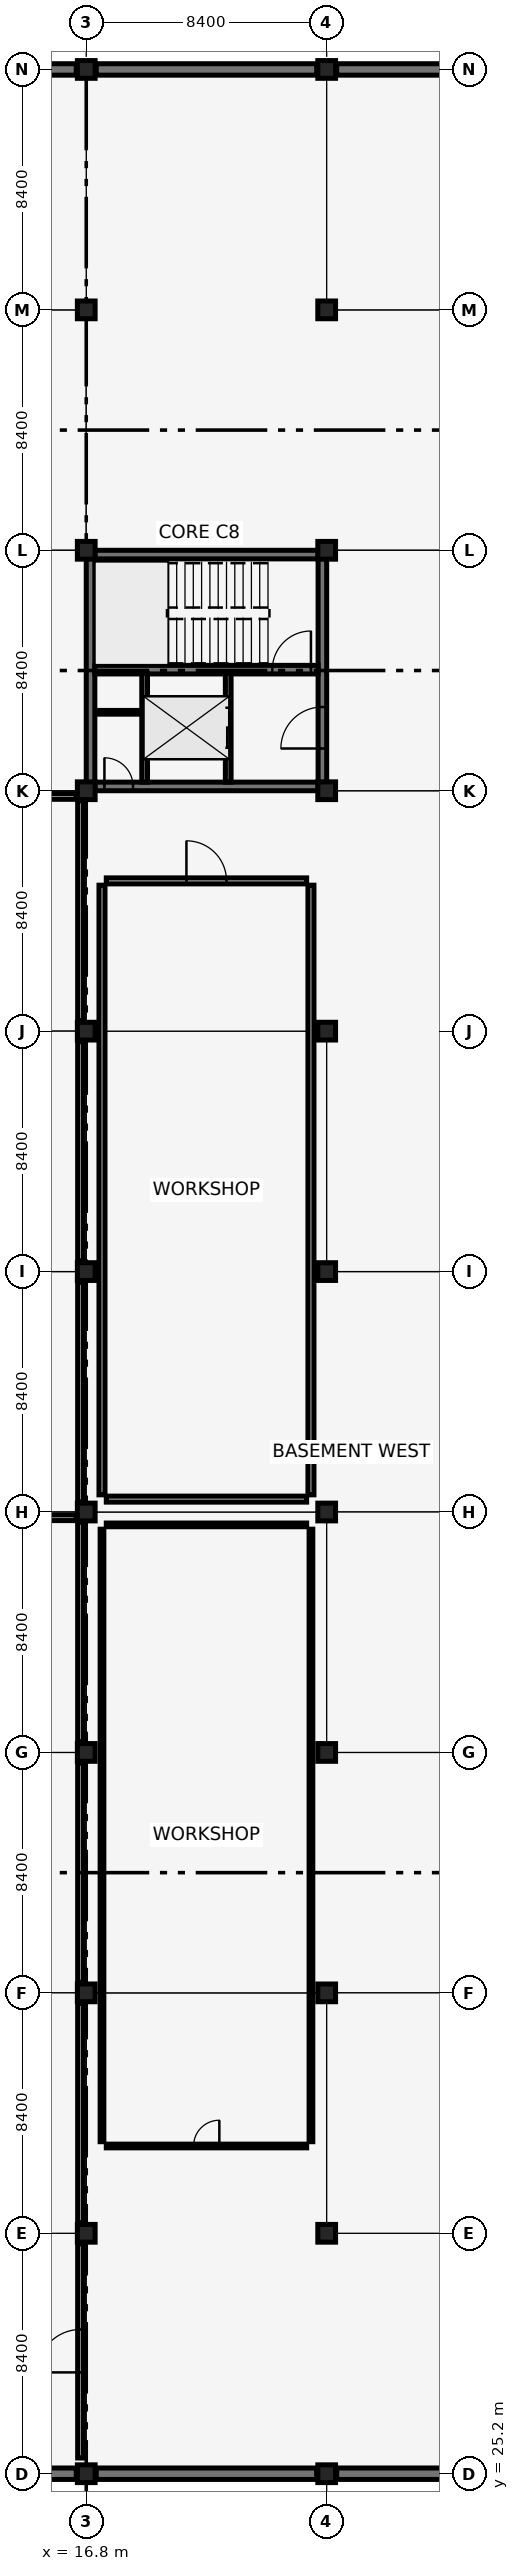
"""IFC4 building model, lengths in metres.
Left out: names, types, materials, properties, quantities, classifications, styles, units other than length and angle.
Written with IfcOpenShell. Run it as: python <this file> out.ifc"""

import sys

from ifc_helpers import new_model, si_unit, direction, frame, frame_2d, origin, origin_2d, place, context, subcontext, project, spatial, rectangle, extrude, element, fill, save


model = new_model("IFC4")
c1 = context("Model", 3, precision=1e-05, world=origin(), true_north=direction((0.0, 1.0)))
c2 = subcontext(c1, "Body", "Model", "MODEL_VIEW")
j1 = project(units=[si_unit("LENGTHUNIT", "METRE"), si_unit("PLANEANGLEUNIT", "RADIAN")], contexts=[c1])
p1 = place(None, origin())
s1 = spatial("IfcSite", under=j1, at=p1, CompositionType="ELEMENT")
p2 = place(p1, origin())
s2 = spatial("IfcBuilding", under=s1, at=p2, CompositionType="ELEMENT")
p3 = place(p2, frame((0.0, 0.0, -4.42)))
s3 = spatial("IfcBuildingStorey", under=s2, at=p3, CompositionType="ELEMENT", Elevation=-4.42)
for number, where, z_axis, x_axis in (
    (1, (8.75, 25.2, 0.0), (0.0, 0.0, 1.0), (1.0, 0.0, 0.0)),
    (2, (8.75, 109.2, 0.0), (0.0, 0.0, 1.0), (1.0, 0.0, 0.0)),
):
    element("IfcWall", number, at=place(p3, frame(where, z_axis=z_axis, x_axis=x_axis)), inside=s3, PredefinedType="USERDEFINED", context=c2, shape_type="SweptSolid", body=[
        extrude(rectangle(XDim=7.7, YDim=0.4, at=frame_2d((3.85, 0.0))), origin(), (0.0, 0.0, 1.0), 4.12),
    ])
for number, where, z_axis, x_axis in (
    (3, (17.15, 25.2, 0.0), (0.0, 0.0, 1.0), (1.0, 0.0, 0.0)),
    (4, (17.15, 109.2, 0.0), (0.0, 0.0, 1.0), (1.0, 0.0, 0.0)),
):
    element("IfcWall", number, at=place(p3, frame(where, z_axis=z_axis, x_axis=x_axis)), inside=s3, PredefinedType="USERDEFINED", context=c2, shape_type="SweptSolid", body=[
        extrude(rectangle(XDim=7.7, YDim=0.4, at=frame_2d((3.85, 0.0))), origin(), (0.0, 0.0, 1.0), 4.12),
    ])
for number, where, z_axis, x_axis in (
    (5, (25.55, 25.2, 0.0), (0.0, 0.0, 1.0), (1.0, 0.0, 0.0)),
    (6, (25.55, 109.2, 0.0), (0.0, 0.0, 1.0), (1.0, 0.0, 0.0)),
):
    element("IfcWall", number, at=place(p3, frame(where, z_axis=z_axis, x_axis=x_axis)), inside=s3, PredefinedType="USERDEFINED", context=c2, shape_type="SweptSolid", body=[
        extrude(rectangle(XDim=7.7, YDim=0.4, at=frame_2d((3.85, 0.0))), origin(), (0.0, 0.0, 1.0), 4.12),
    ])
p4 = place(p3, frame((16.95, 84.15, 0.0), z_axis=(0.0, 0.0, 1.0), x_axis=(1.0, 0.0, 0.0)))
e7 = element("IfcWall", 7, at=p4, inside=s3, PredefinedType="SHEAR", context=c2, shape_type="SweptSolid", body=[
    extrude(rectangle(XDim=8.1, YDim=0.3, at=frame_2d((4.05, 0.0))), origin(), (0.0, 0.0, 1.0), 4.12),
])
p5 = place(p4, frame((0.485, 0.0, 0.0)))
e8 = element("IfcOpeningElement", 8, at=p5, cuts=e7, PredefinedType="OPENING", context=c2, shape_type="SweptSolid", body=[
    extrude(rectangle(XDim=1.0, YDim=2.15, at=frame_2d((0.5, 1.075))), frame((0.0, 0.16, 0.0), z_axis=(0.0, -1.0, 0.0), x_axis=(1.0, 0.0, 0.0)), (0.0, 0.0, 1.0), 0.32),
])
for number, where, z_axis, x_axis in (
    (9, (16.95, 92.25, 0.0), (0.0, 0.0, 1.0), (1.0, 0.0, 0.0)),
    (10, (16.95, 84.15, 0.0), (0.0, 0.0, 1.0), (0.0, 1.0, 0.0)),
):
    element("IfcWall", number, at=place(p3, frame(where, z_axis=z_axis, x_axis=x_axis)), inside=s3, PredefinedType="SHEAR", context=c2, shape_type="SweptSolid", body=[
        extrude(rectangle(XDim=8.1, YDim=0.3, at=frame_2d((4.05, 0.0))), origin(), (0.0, 0.0, 1.0), 4.12),
    ])
p6 = place(p3, frame((25.05, 84.15, 0.0), z_axis=(0.0, 0.0, 1.0), x_axis=(0.0, 1.0, 0.0)))
e11 = element("IfcWall", 11, at=p6, inside=s3, PredefinedType="SHEAR", context=c2, shape_type="SweptSolid", body=[
    extrude(rectangle(XDim=8.1, YDim=0.3, at=frame_2d((4.05, 0.0))), origin(), (0.0, 0.0, 1.0), 4.12),
])
p7 = place(p6, frame((1.325, 0.0, 0.0)))
e12 = element("IfcOpeningElement", 12, at=p7, cuts=e11, PredefinedType="OPENING", context=c2, shape_type="SweptSolid", body=[
    extrude(rectangle(XDim=1.45, YDim=2.15, at=frame_2d((0.725, 1.075))), frame((0.0, 0.16, 0.0), z_axis=(0.0, -1.0, 0.0), x_axis=(1.0, 0.0, 0.0)), (0.0, 0.0, 1.0), 0.32),
])
p8 = place(p3, frame((17.1, 88.23, 0.0), z_axis=(0.0, 0.0, 1.0), x_axis=(1.0, 0.0, 0.0)))
e13 = element("IfcWall", 13, at=p8, inside=s3, PredefinedType="SHEAR", context=c2, shape_type="SweptSolid", body=[
    extrude(rectangle(XDim=7.8, YDim=0.3, at=frame_2d((3.9, 0.0))), origin(), (0.0, 0.0, 1.0), 4.12),
])
p9 = place(p8, frame((6.2, 0.0, 0.0)))
e14 = element("IfcOpeningElement", 14, at=p9, cuts=e13, PredefinedType="OPENING", context=c2, shape_type="SweptSolid", body=[
    extrude(rectangle(XDim=1.35, YDim=2.15, at=frame_2d((0.675, 1.075))), frame((0.0, 0.16, 0.0), z_axis=(0.0, -1.0, 0.0), x_axis=(1.0, 0.0, 0.0)), (0.0, 0.0, 1.0), 0.32),
])
for number, where, z_axis, x_axis in (
    (15, (16.8, 25.2, -0.4), (0.0, 0.0, 1.0), (1.0, 0.0, 0.0)),
    (16, (16.8, 33.6, -0.4), (0.0, 0.0, 1.0), (1.0, 0.0, 0.0)),
    (17, (16.8, 42.0, -0.4), (0.0, 0.0, 1.0), (1.0, 0.0, 0.0)),
    (18, (16.8, 50.4, -0.4), (0.0, 0.0, 1.0), (1.0, 0.0, 0.0)),
    (19, (16.8, 58.8, -0.4), (0.0, 0.0, 1.0), (1.0, 0.0, 0.0)),
    (20, (16.8, 67.2, -0.4), (0.0, 0.0, 1.0), (1.0, 0.0, 0.0)),
    (21, (16.8, 75.6, -0.4), (0.0, 0.0, 1.0), (1.0, 0.0, 0.0)),
    (22, (16.8, 84.0, -0.4), (0.0, 0.0, 1.0), (1.0, 0.0, 0.0)),
    (23, (16.8, 92.4, -0.4), (0.0, 0.0, 1.0), (1.0, 0.0, 0.0)),
    (24, (16.8, 100.8, -0.4), (0.0, 0.0, 1.0), (1.0, 0.0, 0.0)),
    (25, (16.8, 109.2, -0.4), (0.0, 0.0, 1.0), (1.0, 0.0, 0.0)),
    (26, (25.2, 25.2, -0.4), (0.0, 0.0, 1.0), (1.0, 0.0, 0.0)),
    (27, (25.2, 33.6, -0.4), (0.0, 0.0, 1.0), (1.0, 0.0, 0.0)),
    (28, (25.2, 42.0, -0.4), (0.0, 0.0, 1.0), (1.0, 0.0, 0.0)),
    (29, (25.2, 50.4, -0.4), (0.0, 0.0, 1.0), (1.0, 0.0, 0.0)),
    (30, (25.2, 58.8, -0.4), (0.0, 0.0, 1.0), (1.0, 0.0, 0.0)),
    (31, (25.2, 67.2, -0.4), (0.0, 0.0, 1.0), (1.0, 0.0, 0.0)),
    (32, (25.2, 75.6, -0.4), (0.0, 0.0, 1.0), (1.0, 0.0, 0.0)),
    (33, (25.2, 84.0, -0.4), (0.0, 0.0, 1.0), (1.0, 0.0, 0.0)),
    (34, (25.2, 92.4, -0.4), (0.0, 0.0, 1.0), (1.0, 0.0, 0.0)),
    (35, (25.2, 100.8, -0.4), (0.0, 0.0, 1.0), (1.0, 0.0, 0.0)),
    (36, (25.2, 109.2, -0.4), (0.0, 0.0, 1.0), (1.0, 0.0, 0.0)),
):
    element("IfcColumn", number, at=place(p3, frame(where, z_axis=z_axis, x_axis=x_axis)), inside=s3, PredefinedType="COLUMN", context=c2, shape_type="SweptSolid", body=[
        extrude(rectangle(XDim=0.62, YDim=0.62, at=origin_2d()), origin(), (0.0, 0.0, 1.0), 4.52),
    ])
p10 = place(p3, frame((21.76, 84.3, 0.0), z_axis=(0.0, 0.0, 1.0), x_axis=(0.0, 1.0, 0.0)))
e37 = element("IfcWall", 37, at=p10, inside=s3, PredefinedType="SHEAR", context=c2, shape_type="SweptSolid", body=[
    extrude(rectangle(XDim=3.8, YDim=0.2, at=frame_2d((1.9, 0.0))), origin(), (0.0, 0.0, 1.0), 3.2),
])
p11 = place(p10, frame((1.2, 0.0, 0.0)))
e38 = element("IfcOpeningElement", 38, at=p11, cuts=e37, PredefinedType="OPENING", context=c2, shape_type="SweptSolid", body=[
    extrude(rectangle(XDim=1.4, YDim=2.2, at=frame_2d((0.7, 1.1))), frame((0.0, 0.11, 0.0), z_axis=(0.0, -1.0, 0.0), x_axis=(1.0, 0.0, 0.0)), (0.0, 0.0, 1.0), 0.22),
])
p12 = place(p3, frame((18.84, 84.3, 0.0), z_axis=(0.0, 0.0, 1.0), x_axis=(0.0, 1.0, 0.0)))
e39 = element("IfcWall", 39, at=p12, inside=s3, PredefinedType="SHEAR", context=c2, shape_type="SweptSolid", body=[
    extrude(rectangle(XDim=3.8, YDim=0.2, at=frame_2d((1.9, 0.0))), origin(), (0.0, 0.0, 1.0), 3.2),
])
p13 = place(p3, frame((17.12, 86.74, 0.0), z_axis=(0.0, 0.0, 1.0), x_axis=(1.0, 0.0, 0.0)))
e40 = element("IfcWall", 40, at=p13, inside=s3, PredefinedType="PARTITIONING", context=c2, shape_type="SweptSolid", body=[
    extrude(rectangle(XDim=1.62, YDim=0.13, at=frame_2d((0.81, 0.0))), origin(), (0.0, 0.0, 1.0), 3.28),
])
p14 = place(p3, frame((16.6, 25.75, 0.0), z_axis=(0.0, 0.0, 1.0), x_axis=(0.0, 1.0, 0.0)))
e41 = element("IfcWall", 41, at=p14, inside=s3, PredefinedType="PARTITIONING", context=c2, shape_type="SweptSolid", body=[
    extrude(rectangle(XDim=7.48, YDim=0.2, at=frame_2d((3.74, 0.0))), origin(), (0.0, 0.0, 1.0), 3.2),
])
p15 = place(p14, frame((2.99, 0.0, 0.0)))
e42 = element("IfcOpeningElement", 42, at=p15, cuts=e41, PredefinedType="OPENING", context=c2, shape_type="SweptSolid", body=[
    extrude(rectangle(XDim=1.5, YDim=2.2, at=frame_2d((0.75, 1.1))), frame((0.0, 0.11, 0.0), z_axis=(0.0, -1.0, 0.0), x_axis=(1.0, 0.0, 0.0)), (0.0, 0.0, 1.0), 0.22),
])
for number, where, z_axis, x_axis in (
    (43, (16.6, 33.97, 0.0), (0.0, 0.0, 1.0), (0.0, 1.0, 0.0)),
    (44, (16.6, 42.37, 0.0), (0.0, 0.0, 1.0), (0.0, 1.0, 0.0)),
):
    element("IfcWall", number, at=place(p3, frame(where, z_axis=z_axis, x_axis=x_axis)), inside=s3, PredefinedType="PARTITIONING", context=c2, shape_type="SweptSolid", body=[
        extrude(rectangle(XDim=7.66, YDim=0.2, at=frame_2d((3.83, 0.0))), origin(), (0.0, 0.0, 1.0), 3.2),
    ])
for number, where, z_axis, x_axis in (
    (45, (16.6, 50.77, 0.0), (0.0, 0.0, 1.0), (0.0, 1.0, 0.0)),
    (46, (8.77, 58.6, 0.0), (0.0, 0.0, 1.0), (1.0, 0.0, 0.0)),
    (47, (8.77, 83.8, 0.0), (0.0, 0.0, 1.0), (1.0, 0.0, 0.0)),
):
    element("IfcWall", number, at=place(p3, frame(where, z_axis=z_axis, x_axis=x_axis)), inside=s3, PredefinedType="PARTITIONING", context=c2, shape_type="SweptSolid", body=[
        extrude(rectangle(XDim=7.68, YDim=0.2, at=frame_2d((3.84, 0.0))), origin(), (0.0, 0.0, 1.0), 3.2),
    ])
p16 = place(p3, frame((16.6, 59.15, 0.0), z_axis=(0.0, 0.0, 1.0), x_axis=(0.0, 1.0, 0.0)))
e48 = element("IfcWall", 48, at=p16, inside=s3, PredefinedType="PARTITIONING", context=c2, shape_type="SweptSolid", body=[
    extrude(rectangle(XDim=7.68, YDim=0.2, at=frame_2d((3.84, 0.0))), origin(), (0.0, 0.0, 1.0), 3.2),
])
p17 = place(p3, frame((16.6, 67.57, 0.0), z_axis=(0.0, 0.0, 1.0), x_axis=(0.0, 1.0, 0.0)))
e49 = element("IfcWall", 49, at=p17, inside=s3, PredefinedType="PARTITIONING", context=c2, shape_type="SweptSolid", body=[
    extrude(rectangle(XDim=7.66, YDim=0.2, at=frame_2d((3.83, 0.0))), origin(), (0.0, 0.0, 1.0), 3.2),
])
p18 = place(p3, frame((16.6, 75.97, 0.0), z_axis=(0.0, 0.0, 1.0), x_axis=(0.0, 1.0, 0.0)))
e50 = element("IfcWall", 50, at=p18, inside=s3, PredefinedType="PARTITIONING", context=c2, shape_type="SweptSolid", body=[
    extrude(rectangle(XDim=7.68, YDim=0.2, at=frame_2d((3.84, 0.0))), origin(), (0.0, 0.0, 1.0), 3.2),
])
p19 = place(p3, frame((17.5, 36.65, 0.0), z_axis=(0.0, 0.0, 1.0), x_axis=(1.0, 0.0, 0.0)))
e51 = element("IfcWall", 51, at=p19, inside=s3, PredefinedType="PARTITIONING", context=c2, shape_type="SweptSolid", body=[
    extrude(rectangle(XDim=7.0, YDim=0.13, at=frame_2d((3.5, 0.0))), origin(), (0.0, 0.0, 1.0), 4.12),
])
p20 = place(p19, frame((3.05, 0.0, 0.0)))
e52 = element("IfcOpeningElement", 52, at=p20, cuts=e51, PredefinedType="OPENING", context=c2, shape_type="SweptSolid", body=[
    extrude(rectangle(XDim=0.9, YDim=2.1, at=frame_2d((0.45, 1.05))), frame((0.0, 0.075, 0.0), z_axis=(0.0, -1.0, 0.0), x_axis=(1.0, 0.0, 0.0)), (0.0, 0.0, 1.0), 0.15),
])
p21 = place(p3, frame((24.65, 36.8, 0.0), z_axis=(0.0, 0.0, 1.0), x_axis=(0.0, 1.0, 0.0)))
e53 = element("IfcWall", 53, at=p21, inside=s3, PredefinedType="PARTITIONING", context=c2, shape_type="SweptSolid", body=[
    extrude(rectangle(XDim=21.4, YDim=0.13, at=frame_2d((10.7, 0.0))), origin(), (0.0, 0.0, 1.0), 3.2),
])
p22 = place(p3, frame((17.5, 58.35, 0.0), z_axis=(0.0, 0.0, 1.0), x_axis=(1.0, 0.0, 0.0)))
e54 = element("IfcWall", 54, at=p22, inside=s3, PredefinedType="PARTITIONING", context=c2, shape_type="SweptSolid", body=[
    extrude(rectangle(XDim=7.0, YDim=0.13, at=frame_2d((3.5, 0.0))), origin(), (0.0, 0.0, 1.0), 4.12),
])
p23 = place(p3, frame((17.35, 36.8, 0.0), z_axis=(0.0, 0.0, 1.0), x_axis=(0.0, 1.0, 0.0)))
e55 = element("IfcWall", 55, at=p23, inside=s3, PredefinedType="PARTITIONING", context=c2, shape_type="SweptSolid", body=[
    extrude(rectangle(XDim=21.4, YDim=0.13, at=frame_2d((10.7, 0.0))), origin(), (0.0, 0.0, 1.0), 3.2),
])
p24 = place(p3, frame((17.5, 80.85, 0.0), z_axis=(0.0, 0.0, 1.0), x_axis=(1.0, 0.0, 0.0)))
e56 = element("IfcWall", 56, at=p24, inside=s3, PredefinedType="PARTITIONING", context=c2, shape_type="SweptSolid", body=[
    extrude(rectangle(XDim=7.0, YDim=0.21, at=frame_2d((3.5, 0.0))), origin(), (0.0, 0.0, 1.0), 4.12),
])
p25 = place(p24, frame((2.8, 0.0, 0.0)))
e57 = element("IfcOpeningElement", 57, at=p25, cuts=e56, PredefinedType="OPENING", context=c2, shape_type="SweptSolid", body=[
    extrude(rectangle(XDim=1.4, YDim=2.2, at=frame_2d((0.7, 1.1))), frame((0.0, 0.115, 0.0), z_axis=(0.0, -1.0, 0.0), x_axis=(1.0, 0.0, 0.0)), (0.0, 0.0, 1.0), 0.23),
])
p26 = place(p3, frame((24.65, 59.4, 0.0), z_axis=(0.0, 0.0, 1.0), x_axis=(0.0, 1.0, 0.0)))
e58 = element("IfcWall", 58, at=p26, inside=s3, PredefinedType="PARTITIONING", context=c2, shape_type="SweptSolid", body=[
    extrude(rectangle(XDim=21.3, YDim=0.21, at=frame_2d((10.65, 0.0))), origin(), (0.0, 0.0, 1.0), 3.2),
])
p27 = place(p3, frame((17.5, 59.25, 0.0), z_axis=(0.0, 0.0, 1.0), x_axis=(1.0, 0.0, 0.0)))
e59 = element("IfcWall", 59, at=p27, inside=s3, PredefinedType="PARTITIONING", context=c2, shape_type="SweptSolid", body=[
    extrude(rectangle(XDim=7.0, YDim=0.21, at=frame_2d((3.5, 0.0))), origin(), (0.0, 0.0, 1.0), 4.12),
])
p28 = place(p3, frame((17.35, 59.4, 0.0), z_axis=(0.0, 0.0, 1.0), x_axis=(0.0, 1.0, 0.0)))
e60 = element("IfcWall", 60, at=p28, inside=s3, PredefinedType="PARTITIONING", context=c2, shape_type="SweptSolid", body=[
    extrude(rectangle(XDim=21.3, YDim=0.21, at=frame_2d((10.65, 0.0))), origin(), (0.0, 0.0, 1.0), 3.2),
])
p29 = place(p9, origin())
e61 = element("IfcDoor", 61, at=p29, inside=s3, OperationType="SINGLE_SWING_RIGHT", PredefinedType="DOOR", context=c2, shape_type="SweptSolid", body=[
    extrude(rectangle(XDim=1.35, YDim=2.15, at=frame_2d((0.675, 1.075))), frame((0.0, 0.025, 0.0), z_axis=(0.0, -1.0, 0.0), x_axis=(1.0, 0.0, 0.0)), (0.0, 0.0, 1.0), 0.05),
])
fill(e14, e61)
p30 = place(p11, origin())
e62 = element("IfcDoor", 62, at=p30, inside=s3, OperationType="SLIDING_TO_LEFT", PredefinedType="DOOR", context=c2, shape_type="SweptSolid", body=[
    extrude(rectangle(XDim=1.4, YDim=2.2, at=frame_2d((0.7, 1.1))), frame((0.0, 0.025, 0.0), z_axis=(0.0, -1.0, 0.0), x_axis=(1.0, 0.0, 0.0)), (0.0, 0.0, 1.0), 0.05),
])
fill(e38, e62)
p31 = place(p7, origin())
e63 = element("IfcDoor", 63, at=p31, inside=s3, OperationType="DOUBLE_DOOR_SINGLE_SWING", PredefinedType="DOOR", context=c2, shape_type="SweptSolid", body=[
    extrude(rectangle(XDim=1.45, YDim=2.15, at=frame_2d((0.725, 1.075))), frame((0.0, 0.025, 0.0), z_axis=(0.0, -1.0, 0.0), x_axis=(1.0, 0.0, 0.0)), (0.0, 0.0, 1.0), 0.05),
])
fill(e12, e63)
p32 = place(p5, origin())
e64 = element("IfcDoor", 64, at=p32, inside=s3, OperationType="SINGLE_SWING_LEFT", PredefinedType="DOOR", context=c2, shape_type="SweptSolid", body=[
    extrude(rectangle(XDim=1.0, YDim=2.15, at=frame_2d((0.5, 1.075))), frame((0.0, 0.025, 0.0), z_axis=(0.0, -1.0, 0.0), x_axis=(1.0, 0.0, 0.0)), (0.0, 0.0, 1.0), 0.05),
])
fill(e8, e64)
p33 = place(p15, origin())
e65 = element("IfcDoor", 65, at=p33, inside=s3, OperationType="DOUBLE_DOOR_SINGLE_SWING", PredefinedType="DOOR", context=c2, shape_type="SweptSolid", body=[
    extrude(rectangle(XDim=1.5, YDim=2.2, at=frame_2d((0.75, 1.1))), frame((0.0, 0.025, 0.0), z_axis=(0.0, -1.0, 0.0), x_axis=(1.0, 0.0, 0.0)), (0.0, 0.0, 1.0), 0.05),
])
fill(e42, e65)
p34 = place(p20, origin())
e66 = element("IfcDoor", 66, at=p34, inside=s3, OperationType="SINGLE_SWING_RIGHT", PredefinedType="DOOR", context=c2, shape_type="SweptSolid", body=[
    extrude(rectangle(XDim=0.9, YDim=2.1, at=frame_2d((0.45, 1.05))), frame((0.0, 0.025, 0.0), z_axis=(0.0, -1.0, 0.0), x_axis=(1.0, 0.0, 0.0)), (0.0, 0.0, 1.0), 0.05),
])
fill(e52, e66)
p35 = place(p25, origin())
e67 = element("IfcDoor", 67, at=p35, inside=s3, OperationType="DOUBLE_DOOR_SINGLE_SWING", PredefinedType="DOOR", context=c2, shape_type="SweptSolid", body=[
    extrude(rectangle(XDim=1.4, YDim=2.2, at=frame_2d((0.7, 1.1))), frame((0.0, 0.025, 0.0), z_axis=(0.0, -1.0, 0.0), x_axis=(1.0, 0.0, 0.0)), (0.0, 0.0, 1.0), 0.05),
])
fill(e57, e67)
save(model, sys.argv[1])
